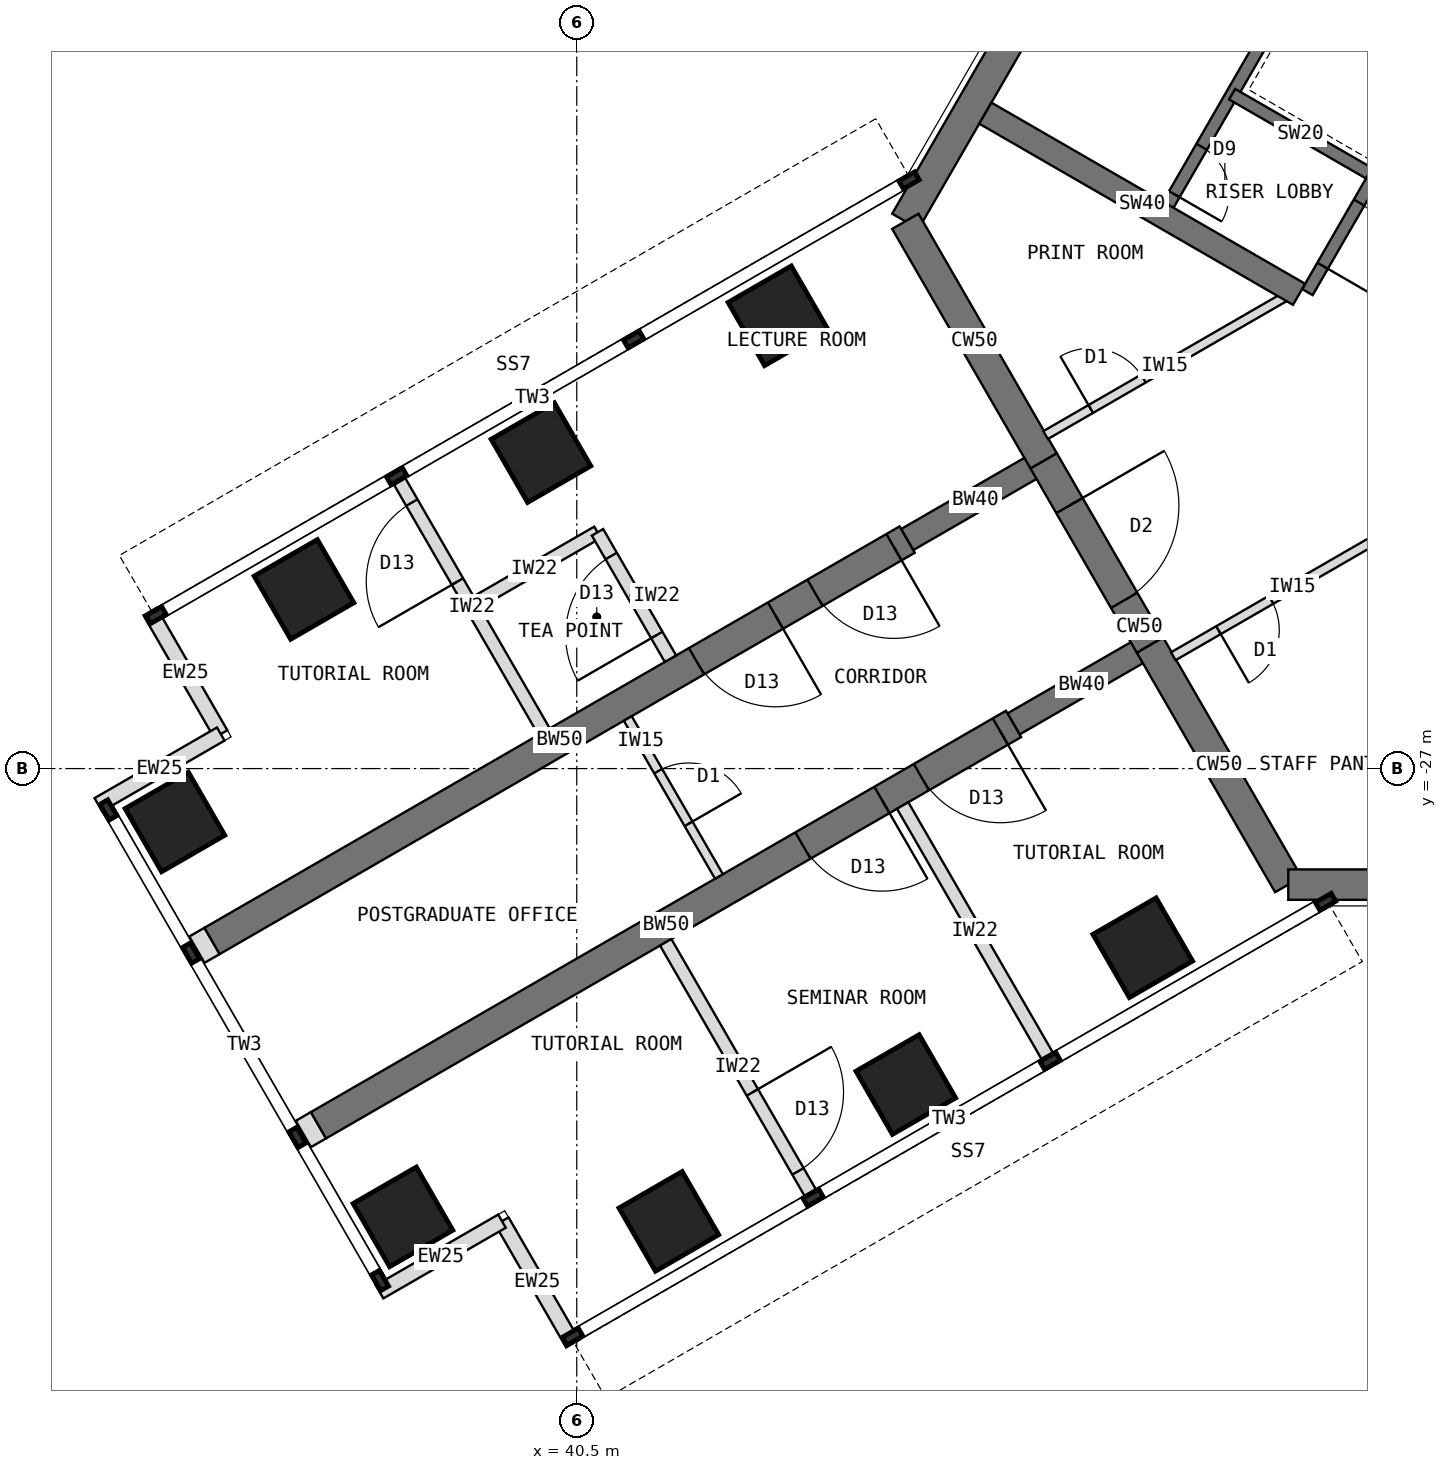
"""IFC4 building model, lengths in metres.
Left out: names, types, materials, properties, quantities, classifications, styles, units other than length and angle.
Written with IfcOpenShell. Run it as: python <this file> out.ifc"""

import sys

from ifc_helpers import new_model, si_unit, direction, frame, frame_2d, origin, origin_2d, place, context, subcontext, project, spatial, rectangle, extrude, element, fill, save


model = new_model("IFC4")
c1 = context("Model", 3, precision=1e-05, world=origin(), true_north=direction((0.0, 1.0)))
c2 = subcontext(c1, "Body", "Model", "MODEL_VIEW")
j1 = project(units=[si_unit("LENGTHUNIT", "METRE"), si_unit("PLANEANGLEUNIT", "RADIAN")], contexts=[c1])
p1 = place(None, origin())
s1 = spatial("IfcSite", under=j1, at=p1, CompositionType="ELEMENT")
p2 = place(p1, origin())
s2 = spatial("IfcBuilding", under=s1, at=p2, CompositionType="ELEMENT")
p3 = place(p2, frame((0.0, 0.0, 186.5)))
s3 = spatial("IfcBuildingStorey", under=s2, at=p3, CompositionType="ELEMENT", Elevation=186.5)
p4 = place(p3, frame((52.202, -7.092, 0.0), z_axis=(0.0, 0.0, 1.0), x_axis=(-0.500005998175, -0.866021940709, 0.0)))
e1 = element("IfcWall", 1, at=p4, inside=s3, PredefinedType="SHEAR", context=c2, shape_type="SweptSolid", body=[
    extrude(rectangle(XDim=12.596, YDim=0.5, at=frame_2d((6.298, 0.0))), origin(), (0.0, 0.0, 1.0), 4.0),
])
p5 = place(p3, frame((45.904, -18.0, 0.0), z_axis=(0.0, 0.0, 1.0), x_axis=(0.500024481964, -0.866011268655, 0.0)))
e2 = element("IfcWall", 2, at=p5, inside=s3, PredefinedType="SHEAR", context=c2, shape_type="SweptSolid", body=[
    extrude(rectangle(XDim=4.548, YDim=0.5, at=frame_2d((2.274, 0.0))), origin(), (0.0, 0.0, 1.0), 4.0),
])
p6 = place(p3, frame((48.178, -21.939, 0.0), z_axis=(0.0, 0.0, 1.0), x_axis=(0.500010275428, -0.866019471182, 0.0)))
e3 = element("IfcWall", 3, at=p6, inside=s3, PredefinedType="SHEAR", context=c2, shape_type="SweptSolid", body=[
    extrude(rectangle(XDim=3.5, YDim=0.5, at=frame_2d((1.75, 0.0))), origin(), (0.0, 0.0, 1.0), 4.0),
])
p7 = place(p6, frame((0.85, 0.0, 0.0)))
e4 = element("IfcOpeningElement", 4, at=p7, cuts=e3, PredefinedType="OPENING", context=c2, shape_type="SweptSolid", body=[
    extrude(rectangle(XDim=1.8, YDim=2.1, at=frame_2d((0.9, 1.05))), frame((0.0, 0.26, 0.0), z_axis=(0.0, -1.0, 0.0), x_axis=(1.0, 0.0, 0.0)), (0.0, 0.0, 1.0), 0.52),
])
p8 = place(p3, frame((49.928, -24.97, 0.0), z_axis=(0.0, 0.0, 1.0), x_axis=(0.499984222037, -0.866034513004, 0.0)))
e5 = element("IfcWall", 5, at=p8, inside=s3, PredefinedType="SHEAR", context=c2, shape_type="SweptSolid", body=[
    extrude(rectangle(XDim=4.548, YDim=0.5, at=frame_2d((2.274, 0.0))), origin(), (0.0, 0.0, 1.0), 4.0),
])
p9 = place(p3, frame((52.202, -28.908, 0.0), z_axis=(0.0, 0.0, 1.0), x_axis=(1.0, 0.0, 0.0)))
e6 = element("IfcWall", 6, at=p9, inside=s3, PredefinedType="SHEAR", context=c2, shape_type="SweptSolid", body=[
    extrude(rectangle(XDim=12.596, YDim=0.5, at=frame_2d((6.298, 0.0))), origin(), (0.0, 0.0, 1.0), 4.0),
])
p10 = place(p3, frame((49.928, -24.97, 0.0), z_axis=(0.0, 0.0, 1.0), x_axis=(-0.866031863473, -0.499988811324, 0.0)))
e7 = element("IfcWall", 7, at=p10, inside=s3, PredefinedType="SHEAR", context=c2, shape_type="SweptSolid", body=[
    extrude(rectangle(XDim=2.592, YDim=0.4, at=frame_2d((1.296, 0.0))), origin(), (0.0, 0.0, 1.0), 4.0),
])
p11 = place(p3, frame((47.684, -26.266, 0.0), z_axis=(0.0, 0.0, 1.0), x_axis=(-0.866027579429, -0.499996231654, 0.0)))
e8 = element("IfcWall", 8, at=p11, inside=s3, PredefinedType="SHEAR", context=c2, shape_type="SweptSolid", body=[
    extrude(rectangle(XDim=13.2, YDim=0.5, at=frame_2d((6.6, 0.0))), origin(), (0.0, 0.0, 1.0), 4.0),
])
p12 = place(p11, frame((0.25, 0.0, 0.0)))
e9 = element("IfcOpeningElement", 9, at=p12, cuts=e8, PredefinedType="OPENING", context=c2, shape_type="SweptSolid", body=[
    extrude(rectangle(XDim=1.5, YDim=2.1, at=frame_2d((0.75, 1.05))), frame((0.0, 0.26, 0.0), z_axis=(0.0, -1.0, 0.0), x_axis=(1.0, 0.0, 0.0)), (0.0, 0.0, 1.0), 0.52),
])
p13 = place(p11, frame((2.5, 0.0, 0.0)))
e10 = element("IfcOpeningElement", 10, at=p13, cuts=e8, PredefinedType="OPENING", context=c2, shape_type="SweptSolid", body=[
    extrude(rectangle(XDim=1.5, YDim=2.1, at=frame_2d((0.75, 1.05))), frame((0.0, 0.26, 0.0), z_axis=(0.0, -1.0, 0.0), x_axis=(1.0, 0.0, 0.0)), (0.0, 0.0, 1.0), 0.52),
])
p14 = place(p3, frame((48.178, -21.939, 0.0), z_axis=(0.0, 0.0, 1.0), x_axis=(-0.866072649678, -0.499918158782, 0.0)))
e11 = element("IfcWall", 11, at=p14, inside=s3, PredefinedType="SHEAR", context=c2, shape_type="SweptSolid", body=[
    extrude(rectangle(XDim=2.592, YDim=0.4, at=frame_2d((1.296, 0.0))), origin(), (0.0, 0.0, 1.0), 4.0),
])
p15 = place(p3, frame((45.934, -23.234, 0.0), z_axis=(0.0, 0.0, 1.0), x_axis=(-0.866019570528, -0.500010103361, 0.0)))
e12 = element("IfcWall", 12, at=p15, inside=s3, PredefinedType="SHEAR", context=c2, shape_type="SweptSolid", body=[
    extrude(rectangle(XDim=13.2, YDim=0.5, at=frame_2d((6.6, 0.0))), origin(), (0.0, 0.0, 1.0), 4.0),
])
p16 = place(p15, frame((0.25, 0.0, 0.0)))
e13 = element("IfcOpeningElement", 13, at=p16, cuts=e12, PredefinedType="OPENING", context=c2, shape_type="SweptSolid", body=[
    extrude(rectangle(XDim=1.5, YDim=2.1, at=frame_2d((0.75, 1.05))), frame((0.0, 0.26, 0.0), z_axis=(0.0, -1.0, 0.0), x_axis=(1.0, 0.0, 0.0)), (0.0, 0.0, 1.0), 0.52),
])
p17 = place(p15, frame((2.5, 0.0, 0.0)))
e14 = element("IfcOpeningElement", 14, at=p17, cuts=e12, PredefinedType="OPENING", context=c2, shape_type="SweptSolid", body=[
    extrude(rectangle(XDim=1.5, YDim=2.1, at=frame_2d((0.75, 1.05))), frame((0.0, 0.26, 0.0), z_axis=(0.0, -1.0, 0.0), x_axis=(1.0, 0.0, 0.0)), (0.0, 0.0, 1.0), 0.52),
])
for number, where, z_axis, x_axis in (
    (15, (49.809, -29.946, 0.0), (0.0, 0.0, 1.0), (0.866, 0.5, 0.0)),
    (16, (43.809, -19.554, 0.0), (0.0, 0.0, 1.0), (0.866, 0.5, 0.0)),
    (17, (45.912, -32.196, 0.0), (0.0, 0.0, 1.0), (0.866, 0.5, 0.0)),
    (18, (39.912, -21.804, 0.0), (0.0, 0.0, 1.0), (0.866, 0.5, 0.0)),
    (19, (42.014, -34.446, 0.0), (0.0, 0.0, 1.0), (0.866, 0.5, 0.0)),
    (20, (36.014, -24.054, 0.0), (0.0, 0.0, 1.0), (0.866, 0.5, 0.0)),
    (21, (37.642, -34.373, 0.0), (0.0, 0.0, 1.0), (0.866, 0.5, 0.0)),
    (22, (33.892, -27.877, 0.0), (0.0, 0.0, 1.0), (0.866, 0.5, 0.0)),
):
    element("IfcColumn", number, at=place(p3, frame(where, z_axis=z_axis, x_axis=x_axis)), inside=s3, PredefinedType="COLUMN", context=c2, shape_type="SweptSolid", body=[
        extrude(rectangle(XDim=1.2, YDim=1.2, at=origin_2d()), origin(), (0.0, 0.0, 1.0), 4.0),
    ])
for number, where, z_axis, x_axis in (
    (23, (40.433, -36.456, 0.0), (0.0, 0.0, 1.0), (-0.5, 0.866, 0.0)),
    (24, (39.27, -34.443, 0.0), (0.0, 0.0, 1.0), (-0.866, -0.5, 0.0)),
    (25, (33.483, -24.419, 0.0), (0.0, 0.0, 1.0), (0.5, -0.866, 0.0)),
    (26, (34.645, -26.432, 0.0), (0.0, 0.0, 1.0), (-0.866, -0.5, 0.0)),
):
    element("IfcWall", number, at=place(p3, frame(where, z_axis=z_axis, x_axis=x_axis)), inside=s3, PredefinedType="STANDARD", context=c2, shape_type="SweptSolid", body=[
        extrude(rectangle(XDim=2.325, YDim=0.25, at=frame_2d((1.163, 0.0))), origin(), (0.0, 0.0, 1.0), 3.8),
    ])
for number, where, z_axis, x_axis in (
    (27, (36.252, -32.865, 0.0), (0.0, 0.0, 1.0), (-0.866, -0.5, 0.0)),
    (28, (34.502, -29.834, 0.0), (0.0, 0.0, 1.0), (-0.866, -0.5, 0.0)),
):
    element("IfcWall", number, at=place(p3, frame(where, z_axis=z_axis, x_axis=x_axis)), inside=s3, PredefinedType="PARTITIONING", context=c2, shape_type="SweptSolid", body=[
        extrude(rectangle(XDim=0.288, YDim=0.5, at=frame_2d((0.144, 0.0))), origin(), (0.0, 0.0, 1.0), 3.8),
    ])
p18 = place(p3, frame((56.516, -12.236, 0.0), z_axis=(0.0, 0.0, 1.0), x_axis=(-0.49999894854, -0.866026010844, 0.0)))
e29 = element("IfcWall", 29, at=p18, inside=s3, PredefinedType="SHEAR", context=c2, shape_type="SweptSolid", body=[
    extrude(rectangle(XDim=8.0, YDim=0.2, at=frame_2d((4.0, 0.0))), origin(), (0.0, 0.0, 1.0), 4.0),
])
p19 = place(p18, frame((6.3, 0.0, 0.0)))
e30 = element("IfcOpeningElement", 30, at=p19, cuts=e29, PredefinedType="OPENING", context=c2, shape_type="SweptSolid", body=[
    extrude(rectangle(XDim=1.2, YDim=2.1, at=frame_2d((0.6, 1.05))), frame((0.0, 0.11, 0.0), z_axis=(0.0, -1.0, 0.0), x_axis=(1.0, 0.0, 0.0)), (0.0, 0.0, 1.0), 0.22),
])
p20 = place(p3, frame((53.53, -17.209, 0.0), z_axis=(0.0, 0.0, 1.0), x_axis=(-0.866062058628, 0.499936506574, 0.0)))
e31 = element("IfcWall", 31, at=p20, inside=s3, PredefinedType="SHEAR", context=c2, shape_type="SweptSolid", body=[
    extrude(rectangle(XDim=2.6, YDim=0.2, at=frame_2d((1.3, 0.0))), origin(), (0.0, 0.0, 1.0), 4.0),
])
p21 = place(p3, frame((54.178, -10.886, 0.0), z_axis=(0.0, 0.0, 1.0), x_axis=(-0.49999894854, -0.866026010844, 0.0)))
e32 = element("IfcWall", 32, at=p21, inside=s3, PredefinedType="SHEAR", context=c2, shape_type="SweptSolid", body=[
    extrude(rectangle(XDim=8.0, YDim=0.2, at=frame_2d((4.0, 0.0))), origin(), (0.0, 0.0, 1.0), 4.0),
])
p22 = place(p21, frame((6.8, 0.0, 0.0)))
e33 = element("IfcOpeningElement", 33, at=p22, cuts=e32, PredefinedType="OPENING", context=c2, shape_type="SweptSolid", body=[
    extrude(rectangle(XDim=0.9, YDim=2.1, at=frame_2d((0.45, 1.05))), frame((0.0, 0.11, 0.0), z_axis=(0.0, -1.0, 0.0), x_axis=(1.0, 0.0, 0.0)), (0.0, 0.0, 1.0), 0.22),
])
p23 = place(p3, frame((52.38, -19.201, 0.0), z_axis=(0.0, 0.0, 1.0), x_axis=(-0.866012946976, 0.500021575205, 0.0)))
e34 = element("IfcWall", 34, at=p23, inside=s3, PredefinedType="SHEAR", context=c2, shape_type="SweptSolid", body=[
    extrude(rectangle(XDim=5.958, YDim=0.4, at=frame_2d((2.979, 0.0))), origin(), (0.0, 0.0, 1.0), 4.0),
])
p24 = place(p3, frame((45.86, -27.607, 0.0), z_axis=(0.0, 0.0, 1.0), x_axis=(0.499986429846, -0.866033238375, 0.0)))
e35 = element("IfcWall", 35, at=p24, inside=s3, PredefinedType="PARTITIONING", context=c2, shape_type="SweptSolid", body=[
    extrude(rectangle(XDim=4.75, YDim=0.215, at=frame_2d((2.375, 0.0))), origin(), (0.0, 0.0, 1.0), 3.8),
])
p25 = place(p3, frame((41.963, -29.857, 0.0), z_axis=(0.0, 0.0, 1.0), x_axis=(0.499986429846, -0.866033238375, 0.0)))
e36 = element("IfcWall", 36, at=p25, inside=s3, PredefinedType="PARTITIONING", context=c2, shape_type="SweptSolid", body=[
    extrude(rectangle(XDim=4.75, YDim=0.215, at=frame_2d((2.375, 0.0))), origin(), (0.0, 0.0, 1.0), 3.8),
])
p26 = place(p25, frame((2.85, 0.0, 0.0)))
e37 = element("IfcOpeningElement", 37, at=p26, cuts=e36, PredefinedType="OPENING", context=c2, shape_type="SweptSolid", body=[
    extrude(rectangle(XDim=1.5, YDim=2.1, at=frame_2d((0.75, 1.05))), frame((0.0, 0.117, 0.0), z_axis=(0.0, -1.0, 0.0), x_axis=(1.0, 0.0, 0.0)), (0.0, 0.0, 1.0), 0.235),
])
p27 = place(p3, frame((39.963, -26.393, 0.0), z_axis=(0.0, 0.0, 1.0), x_axis=(-0.499986429846, 0.866033238375, 0.0)))
e38 = element("IfcWall", 38, at=p27, inside=s3, PredefinedType="PARTITIONING", context=c2, shape_type="SweptSolid", body=[
    extrude(rectangle(XDim=4.75, YDim=0.215, at=frame_2d((2.375, 0.0))), origin(), (0.0, 0.0, 1.0), 3.8),
])
p28 = place(p27, frame((2.85, 0.0, 0.0)))
e39 = element("IfcOpeningElement", 39, at=p28, cuts=e38, PredefinedType="OPENING", context=c2, shape_type="SweptSolid", body=[
    extrude(rectangle(XDim=1.5, YDim=2.1, at=frame_2d((0.75, 1.05))), frame((0.0, 0.117, 0.0), z_axis=(0.0, -1.0, 0.0), x_axis=(1.0, 0.0, 0.0)), (0.0, 0.0, 1.0), 0.235),
])
p29 = place(p3, frame((40.842, -23.115, 0.0), z_axis=(0.0, 0.0, 1.0), x_axis=(-0.866050077142, -0.499957262057, 0.0)))
e40 = element("IfcWall", 40, at=p29, inside=s3, PredefinedType="PARTITIONING", context=c2, shape_type="SweptSolid", body=[
    extrude(rectangle(XDim=2.4, YDim=0.215, at=frame_2d((1.2, 0.0))), origin(), (0.0, 0.0, 1.0), 3.8),
])
p30 = place(p3, frame((42.042, -25.193, 0.0), z_axis=(0.0, 0.0, 1.0), x_axis=(-0.500001309137, 0.866024647952, 0.0)))
e41 = element("IfcWall", 41, at=p30, inside=s3, PredefinedType="PARTITIONING", context=c2, shape_type="SweptSolid", body=[
    extrude(rectangle(XDim=2.4, YDim=0.215, at=frame_2d((1.2, 0.0))), origin(), (0.0, 0.0, 1.0), 3.8),
])
p31 = place(p30, frame((0.45, 0.0, 0.0)))
e42 = element("IfcOpeningElement", 42, at=p31, cuts=e41, PredefinedType="OPENING", context=c2, shape_type="SweptSolid", body=[
    extrude(rectangle(XDim=1.5, YDim=2.1, at=frame_2d((0.75, 1.05))), frame((0.0, 0.117, 0.0), z_axis=(0.0, -1.0, 0.0), x_axis=(1.0, 0.0, 0.0)), (0.0, 0.0, 1.0), 0.235),
])
p32 = place(p3, frame((54.23, -22.89, 0.0), z_axis=(0.0, 0.0, 1.0), x_axis=(-0.866006805923, -0.500032211057, 0.0)))
e43 = element("IfcWall", 43, at=p32, inside=s3, PredefinedType="PARTITIONING", context=c2, shape_type="SweptSolid", body=[
    extrude(rectangle(XDim=4.526, YDim=0.15, at=frame_2d((2.263, 0.0))), origin(), (0.0, 0.0, 1.0), 3.8),
])
p33 = place(p32, frame((2.668, 0.0, 0.0)))
e44 = element("IfcOpeningElement", 44, at=p33, cuts=e43, PredefinedType="OPENING", context=c2, shape_type="SweptSolid", body=[
    extrude(rectangle(XDim=1.0, YDim=2.1, at=frame_2d((0.5, 1.05))), frame((0.0, 0.085, 0.0), z_axis=(0.0, -1.0, 0.0), x_axis=(1.0, 0.0, 0.0)), (0.0, 0.0, 1.0), 0.17),
])
p34 = place(p3, frame((48.211, -21.515, 0.0), z_axis=(0.0, 0.0, 1.0), x_axis=(0.866043651885, 0.499968392031, 0.0)))
e45 = element("IfcWall", 45, at=p34, inside=s3, PredefinedType="PARTITIONING", context=c2, shape_type="SweptSolid", body=[
    extrude(rectangle(XDim=4.526, YDim=0.15, at=frame_2d((2.263, 0.0))), origin(), (0.0, 0.0, 1.0), 3.8),
])
p35 = place(p34, frame((0.858, 0.0, 0.0)))
e46 = element("IfcOpeningElement", 46, at=p35, cuts=e45, PredefinedType="OPENING", context=c2, shape_type="SweptSolid", body=[
    extrude(rectangle(XDim=1.0, YDim=2.1, at=frame_2d((0.5, 1.05))), frame((0.0, 0.085, 0.0), z_axis=(0.0, -1.0, 0.0), x_axis=(1.0, 0.0, 0.0)), (0.0, 0.0, 1.0), 0.17),
])
p36 = place(p3, frame((41.339, -26.176, 0.0), z_axis=(0.0, 0.0, 1.0), x_axis=(0.50002537861, -0.866010750942, 0.0)))
e47 = element("IfcWall", 47, at=p36, inside=s3, PredefinedType="PARTITIONING", context=c2, shape_type="SweptSolid", body=[
    extrude(rectangle(XDim=3.0, YDim=0.15, at=frame_2d((1.5, 0.0))), origin(), (0.0, 0.0, 1.0), 3.8),
])
p37 = place(p36, frame((1.0, 0.0, 0.0)))
e48 = element("IfcOpeningElement", 48, at=p37, cuts=e47, PredefinedType="OPENING", context=c2, shape_type="SweptSolid", body=[
    extrude(rectangle(XDim=1.0, YDim=2.1, at=frame_2d((0.5, 1.05))), frame((0.0, 0.085, 0.0), z_axis=(0.0, -1.0, 0.0), x_axis=(1.0, 0.0, 0.0)), (0.0, 0.0, 1.0), 0.17),
])
p38 = place(p19, origin())
e49 = element("IfcDoor", 49, at=p38, inside=s3, OperationType="SINGLE_SWING_RIGHT", PredefinedType="DOOR", context=c2, shape_type="SweptSolid", body=[
    extrude(rectangle(XDim=1.2, YDim=2.1, at=frame_2d((0.6, 1.05))), frame((0.0, 0.025, 0.0), z_axis=(0.0, -1.0, 0.0), x_axis=(1.0, 0.0, 0.0)), (0.0, 0.0, 1.0), 0.05),
])
fill(e30, e49)
p39 = place(p22, origin())
e50 = element("IfcDoor", 50, at=p39, inside=s3, OperationType="SINGLE_SWING_RIGHT", PredefinedType="DOOR", context=c2, shape_type="SweptSolid", body=[
    extrude(rectangle(XDim=0.9, YDim=2.1, at=frame_2d((0.45, 1.05))), frame((0.0, 0.025, 0.0), z_axis=(0.0, -1.0, 0.0), x_axis=(1.0, 0.0, 0.0)), (0.0, 0.0, 1.0), 0.05),
])
fill(e33, e50)
p40 = place(p7, origin())
e51 = element("IfcDoor", 51, at=p40, inside=s3, OperationType="DOUBLE_DOOR_DOUBLE_SWING", PredefinedType="DOOR", context=c2, shape_type="SweptSolid", body=[
    extrude(rectangle(XDim=1.8, YDim=2.1, at=frame_2d((0.9, 1.05))), frame((0.0, 0.025, 0.0), z_axis=(0.0, -1.0, 0.0), x_axis=(1.0, 0.0, 0.0)), (0.0, 0.0, 1.0), 0.05),
])
fill(e4, e51)
p41 = place(p26, origin())
e52 = element("IfcDoor", 52, at=p41, inside=s3, OperationType="DOUBLE_DOOR_SINGLE_SWING", PredefinedType="DOOR", context=c2, shape_type="SweptSolid", body=[
    extrude(rectangle(XDim=1.5, YDim=2.1, at=frame_2d((0.75, 1.05))), frame((0.0, 0.025, 0.0), z_axis=(0.0, -1.0, 0.0), x_axis=(1.0, 0.0, 0.0)), (0.0, 0.0, 1.0), 0.05),
])
fill(e37, e52)
p42 = place(p28, origin())
e53 = element("IfcDoor", 53, at=p42, inside=s3, OperationType="DOUBLE_DOOR_SINGLE_SWING", PredefinedType="DOOR", context=c2, shape_type="SweptSolid", body=[
    extrude(rectangle(XDim=1.5, YDim=2.1, at=frame_2d((0.75, 1.05))), frame((0.0, 0.025, 0.0), z_axis=(0.0, -1.0, 0.0), x_axis=(1.0, 0.0, 0.0)), (0.0, 0.0, 1.0), 0.05),
])
fill(e39, e53)
p43 = place(p31, origin())
e54 = element("IfcDoor", 54, at=p43, inside=s3, OperationType="DOUBLE_DOOR_SINGLE_SWING", PredefinedType="DOOR", context=c2, shape_type="SweptSolid", body=[
    extrude(rectangle(XDim=1.5, YDim=2.1, at=frame_2d((0.75, 1.05))), frame((0.0, 0.025, 0.0), z_axis=(0.0, -1.0, 0.0), x_axis=(1.0, 0.0, 0.0)), (0.0, 0.0, 1.0), 0.05),
])
fill(e42, e54)
p44 = place(p35, origin())
e55 = element("IfcDoor", 55, at=p44, inside=s3, OperationType="SINGLE_SWING_LEFT", PredefinedType="DOOR", context=c2, shape_type="SweptSolid", body=[
    extrude(rectangle(XDim=1.0, YDim=2.1, at=frame_2d((0.5, 1.05))), frame((0.0, 0.025, 0.0), z_axis=(0.0, -1.0, 0.0), x_axis=(1.0, 0.0, 0.0)), (0.0, 0.0, 1.0), 0.05),
])
fill(e46, e55)
p45 = place(p33, origin())
e56 = element("IfcDoor", 56, at=p45, inside=s3, OperationType="SINGLE_SWING_RIGHT", PredefinedType="DOOR", context=c2, shape_type="SweptSolid", body=[
    extrude(rectangle(XDim=1.0, YDim=2.1, at=frame_2d((0.5, 1.05))), frame((0.0, 0.025, 0.0), z_axis=(0.0, -1.0, 0.0), x_axis=(1.0, 0.0, 0.0)), (0.0, 0.0, 1.0), 0.05),
])
fill(e44, e56)
p46 = place(p37, origin())
e57 = element("IfcDoor", 57, at=p46, inside=s3, OperationType="SINGLE_SWING_RIGHT", PredefinedType="DOOR", context=c2, shape_type="SweptSolid", body=[
    extrude(rectangle(XDim=1.0, YDim=2.1, at=frame_2d((0.5, 1.05))), frame((0.0, 0.025, 0.0), z_axis=(0.0, -1.0, 0.0), x_axis=(1.0, 0.0, 0.0)), (0.0, 0.0, 1.0), 0.05),
])
fill(e48, e57)
p47 = place(p12, origin())
e58 = element("IfcDoor", 58, at=p47, inside=s3, OperationType="DOUBLE_DOOR_SINGLE_SWING", PredefinedType="DOOR", context=c2, shape_type="SweptSolid", body=[
    extrude(rectangle(XDim=1.5, YDim=2.1, at=frame_2d((0.75, 1.05))), frame((0.0, 0.025, 0.0), z_axis=(0.0, -1.0, 0.0), x_axis=(1.0, 0.0, 0.0)), (0.0, 0.0, 1.0), 0.05),
])
fill(e9, e58)
p48 = place(p13, origin())
e59 = element("IfcDoor", 59, at=p48, inside=s3, OperationType="DOUBLE_DOOR_SINGLE_SWING", PredefinedType="DOOR", context=c2, shape_type="SweptSolid", body=[
    extrude(rectangle(XDim=1.5, YDim=2.1, at=frame_2d((0.75, 1.05))), frame((0.0, 0.025, 0.0), z_axis=(0.0, -1.0, 0.0), x_axis=(1.0, 0.0, 0.0)), (0.0, 0.0, 1.0), 0.05),
])
fill(e10, e59)
p49 = place(p16, origin())
e60 = element("IfcDoor", 60, at=p49, inside=s3, OperationType="DOUBLE_DOOR_SINGLE_SWING", PredefinedType="DOOR", context=c2, shape_type="SweptSolid", body=[
    extrude(rectangle(XDim=1.5, YDim=2.1, at=frame_2d((0.75, 1.05))), frame((0.0, 0.025, 0.0), z_axis=(0.0, -1.0, 0.0), x_axis=(1.0, 0.0, 0.0)), (0.0, 0.0, 1.0), 0.05),
])
fill(e13, e60)
p50 = place(p17, origin())
e61 = element("IfcDoor", 61, at=p50, inside=s3, OperationType="DOUBLE_DOOR_SINGLE_SWING", PredefinedType="DOOR", context=c2, shape_type="SweptSolid", body=[
    extrude(rectangle(XDim=1.5, YDim=2.1, at=frame_2d((0.75, 1.05))), frame((0.0, 0.025, 0.0), z_axis=(0.0, -1.0, 0.0), x_axis=(1.0, 0.0, 0.0)), (0.0, 0.0, 1.0), 0.05),
])
fill(e14, e61)
save(model, sys.argv[1])
